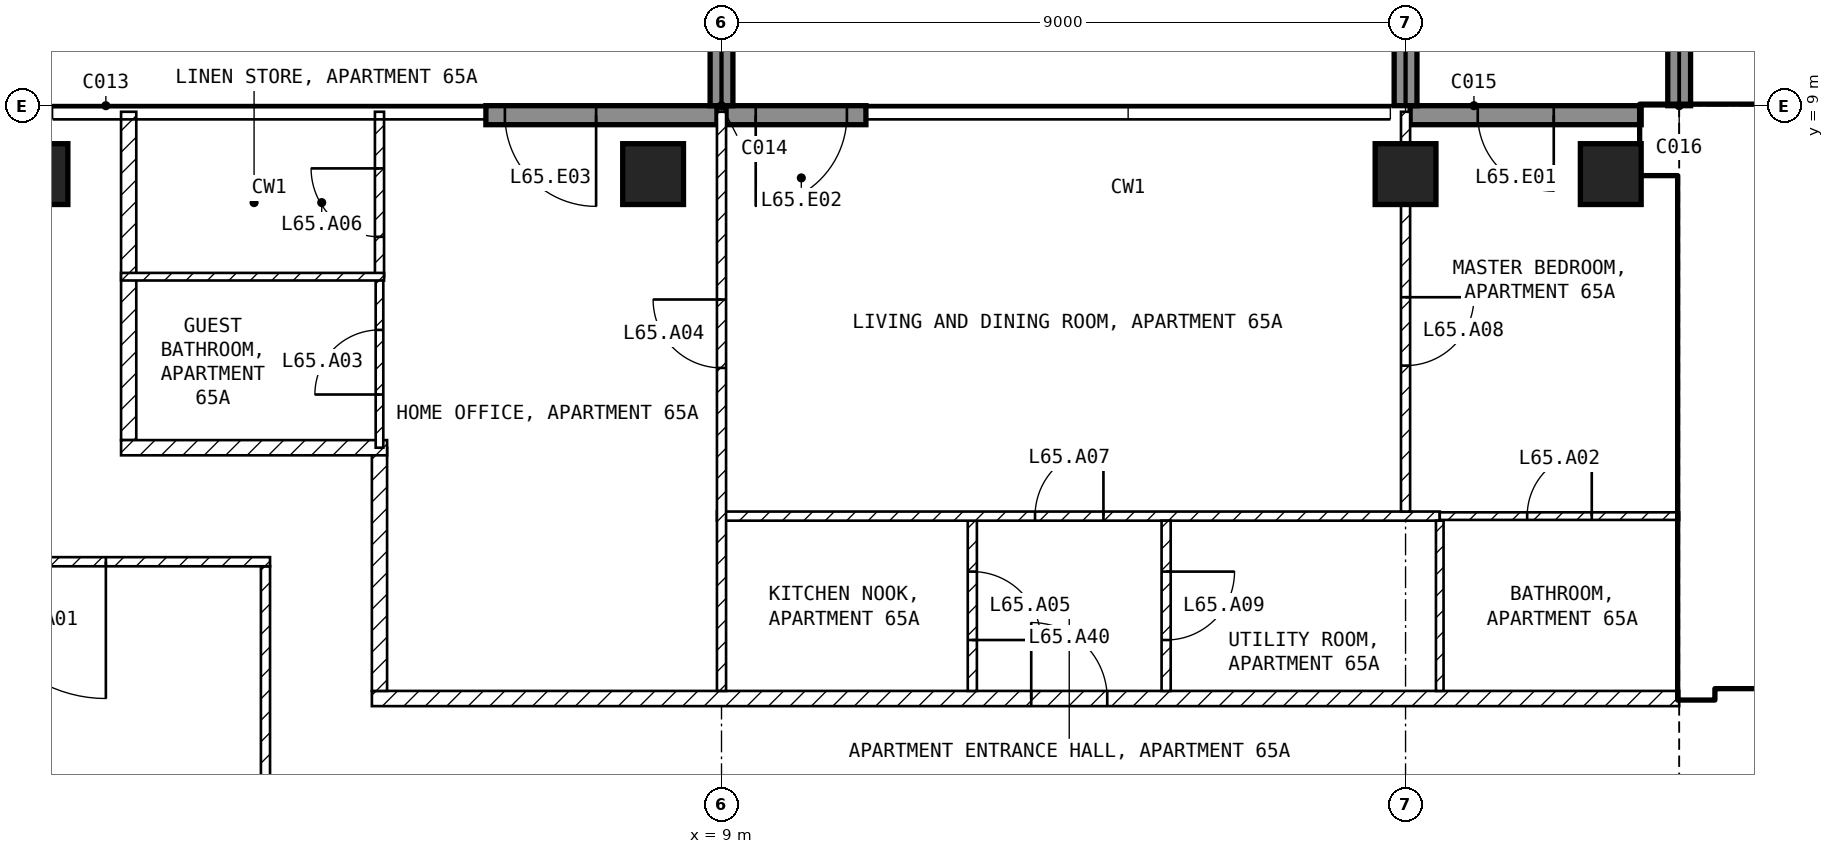
"""IFC4 building model, lengths in metres.
Left out: names, types, materials, properties, quantities, classifications, styles, units other than length and angle.
Written with IfcOpenShell. Run it as: python <this file> out.ifc"""

import sys

from ifc_helpers import new_model, si_unit, direction, frame, frame_2d, origin, origin_2d, place, context, subcontext, project, spatial, rectangle, extrude, element, fill, save


model = new_model("IFC4")
c1 = context("Model", 3, precision=1e-05, world=origin(), true_north=direction((0.0, 1.0)))
c2 = subcontext(c1, "Body", "Model", "MODEL_VIEW")
j1 = project(units=[si_unit("LENGTHUNIT", "METRE"), si_unit("PLANEANGLEUNIT", "RADIAN")], contexts=[c1])
p1 = place(None, origin())
s1 = spatial("IfcSite", under=j1, at=p1, CompositionType="ELEMENT")
p2 = place(p1, origin())
s2 = spatial("IfcBuilding", under=s1, at=p2, CompositionType="ELEMENT")
p3 = place(p2, frame((0.0, 0.0, 257.0)))
s3 = spatial("IfcBuildingStorey", under=s2, at=p3, CompositionType="ELEMENT", Elevation=257.0)
for number, where, z_axis, x_axis in (
    (1, (0.0, 8.1, -0.25), (0.0, 0.0, 1.0), (1.0, 0.0, 0.0)),
    (2, (8.1, 8.1, -0.25), (0.0, 0.0, 1.0), (1.0, 0.0, 0.0)),
    (3, (18.0, 8.1, -0.25), (0.0, 0.0, 1.0), (1.0, 0.0, 0.0)),
    (4, (20.7, 8.1, -0.25), (0.0, 0.0, 1.0), (1.0, 0.0, 0.0)),
):
    element("IfcColumn", number, at=place(p3, frame(where, z_axis=z_axis, x_axis=x_axis)), inside=s3, PredefinedType="COLUMN", context=c2, shape_type="SweptSolid", body=[
        extrude(rectangle(XDim=0.8, YDim=0.8, at=origin_2d()), origin(), (0.0, 0.0, 1.0), 3.5),
    ])
p4 = place(p3, frame((21.1, 8.875, 0.0), z_axis=(0.0, 0.0, 1.0), x_axis=(-1.0, 0.0, 0.0)))
e5 = element("IfcWall", 5, at=p4, inside=s3, PredefinedType="SOLIDWALL", context=c2, shape_type="SweptSolid", body=[
    extrude(rectangle(XDim=3.04, YDim=0.25, at=frame_2d((1.52, 0.0))), origin(), (0.0, 0.0, 1.0), 3.25),
])
p5 = place(p4, frame((1.15, 0.0, 0.0)))
e6 = element("IfcOpeningElement", 6, at=p5, cuts=e5, PredefinedType="OPENING", context=c2, shape_type="SweptSolid", body=[
    extrude(rectangle(XDim=1.0, YDim=2.4, at=frame_2d((0.5, 1.2))), frame((0.0, 0.135, 0.0), z_axis=(0.0, -1.0, 0.0), x_axis=(1.0, 0.0, 0.0)), (0.0, 0.0, 1.0), 0.27),
])
p6 = place(p3, frame((10.9, 8.875, 0.0), z_axis=(0.0, 0.0, 1.0), x_axis=(-1.0, 0.0, 0.0)))
e7 = element("IfcWall", 7, at=p6, inside=s3, PredefinedType="SOLIDWALL", context=c2, shape_type="SweptSolid", body=[
    extrude(rectangle(XDim=1.84, YDim=0.25, at=frame_2d((0.92, 0.0))), origin(), (0.0, 0.0, 1.0), 3.25),
])
p7 = place(p6, frame((0.25, 0.0, 0.0)))
e8 = element("IfcOpeningElement", 8, at=p7, cuts=e7, PredefinedType="OPENING", context=c2, shape_type="SweptSolid", body=[
    extrude(rectangle(XDim=1.2, YDim=2.4, at=frame_2d((0.6, 1.2))), frame((0.0, 0.135, 0.0), z_axis=(0.0, -1.0, 0.0), x_axis=(1.0, 0.0, 0.0)), (0.0, 0.0, 1.0), 0.27),
])
p8 = place(p3, frame((8.94, 8.875, 0.0), z_axis=(0.0, 0.0, 1.0), x_axis=(-1.0, 0.0, 0.0)))
e9 = element("IfcWall", 9, at=p8, inside=s3, PredefinedType="SOLIDWALL", context=c2, shape_type="SweptSolid", body=[
    extrude(rectangle(XDim=3.04, YDim=0.25, at=frame_2d((1.52, 0.0))), origin(), (0.0, 0.0, 1.0), 3.25),
])
p9 = place(p8, frame((1.59, 0.0, 0.0)))
e10 = element("IfcOpeningElement", 10, at=p9, cuts=e9, PredefinedType="OPENING", context=c2, shape_type="SweptSolid", body=[
    extrude(rectangle(XDim=1.2, YDim=2.4, at=frame_2d((0.6, 1.2))), frame((0.0, 0.135, 0.0), z_axis=(0.0, -1.0, 0.0), x_axis=(1.0, 0.0, 0.0)), (0.0, 0.0, 1.0), 0.27),
])
for number, where, z_axis, x_axis in (
    (11, (9.0, 9.0, 0.0), (0.0, 0.0, 1.0), (0.0, 1.0, 0.0)),
    (12, (18.0, 9.0, 0.0), (0.0, 0.0, 1.0), (0.0, 1.0, 0.0)),
    (13, (21.6, 9.0, 0.0), (0.0, 0.0, 1.0), (0.0, 1.0, 0.0)),
):
    element("IfcWall", number, at=place(p3, frame(where, z_axis=z_axis, x_axis=x_axis)), inside=s3, PredefinedType="SOLIDWALL", context=c2, shape_type="SweptSolid", body=[
        extrude(rectangle(XDim=2.7, YDim=0.3, at=frame_2d((1.35, 0.0))), origin(), (0.0, 0.0, 1.0), 3.25),
    ])
p10 = place(p3, frame((21.1, 8.55, 0.0), z_axis=(0.0, 0.0, 1.0), x_axis=(1.0, 0.0, 0.0)))
e14 = element("IfcWall", 14, at=p10, inside=s3, PredefinedType="SHEAR", context=c2, shape_type="SweptSolid", body=[
    extrude(rectangle(XDim=8.65, YDim=0.9, at=frame_2d((4.325, 0.0))), origin(), (0.0, 0.0, 1.0), 3.25),
])
p11 = place(p3, frame((21.825, 1.2, 0.0), z_axis=(0.0, 0.0, 1.0), x_axis=(0.0, 1.0, 0.0)))
e15 = element("IfcWall", 15, at=p11, inside=s3, PredefinedType="SHEAR", context=c2, shape_type="SweptSolid", body=[
    extrude(rectangle(XDim=6.9, YDim=0.45, at=frame_2d((3.45, 0.0))), origin(), (0.0, 0.0, 1.0), 3.25),
])
p12 = place(p3, frame((22.05, 1.45, 0.0), z_axis=(0.0, 0.0, 1.0), x_axis=(1.0, 0.0, 0.0)))
e16 = element("IfcWall", 16, at=p12, inside=s3, PredefinedType="SOLIDWALL", context=c2, shape_type="SweptSolid", body=[
    extrude(rectangle(XDim=11.3, YDim=0.2, at=frame_2d((5.65, 0.0))), origin(), (0.0, 0.0, 1.0), 3.25),
])
p13 = place(p12, frame((0.75, 0.0, 0.0)))
e17 = element("IfcOpeningElement", 17, at=p13, cuts=e16, PredefinedType="OPENING", context=c2, shape_type="SweptSolid", body=[
    extrude(rectangle(XDim=1.0, YDim=2.1, at=frame_2d((0.5, 1.05))), frame((0.0, 0.11, 0.0), z_axis=(0.0, -1.0, 0.0), x_axis=(1.0, 0.0, 0.0)), (0.0, 0.0, 1.0), 0.22),
])
p14 = place(p12, frame((3.25, 0.0, 0.0)))
e18 = element("IfcOpeningElement", 18, at=p14, cuts=e16, PredefinedType="OPENING", context=c2, shape_type="SweptSolid", body=[
    extrude(rectangle(XDim=1.0, YDim=2.1, at=frame_2d((0.5, 1.05))), frame((0.0, 0.11, 0.0), z_axis=(0.0, -1.0, 0.0), x_axis=(1.0, 0.0, 0.0)), (0.0, 0.0, 1.0), 0.22),
])
p15 = place(p12, frame((9.225, 0.0, 0.0)))
e19 = element("IfcOpeningElement", 19, at=p15, cuts=e16, PredefinedType="OPENING", context=c2, shape_type="SweptSolid", body=[
    extrude(rectangle(XDim=0.9, YDim=2.1, at=frame_2d((0.45, 1.05))), frame((0.0, 0.11, 0.0), z_axis=(0.0, -1.0, 0.0), x_axis=(1.0, 0.0, 0.0)), (0.0, 0.0, 1.0), 0.22),
])
p16 = place(p3, frame((22.05, 5.15, 0.0), z_axis=(0.0, 0.0, 1.0), x_axis=(1.0, 0.0, 0.0)))
e20 = element("IfcWall", 20, at=p16, inside=s3, PredefinedType="SOLIDWALL", context=c2, shape_type="SweptSolid", body=[
    extrude(rectangle(XDim=6.3, YDim=0.2, at=frame_2d((3.15, 0.0))), origin(), (0.0, 0.0, 1.0), 3.25),
])
p17 = place(p16, frame((0.2, 0.0, 0.0)))
e21 = element("IfcOpeningElement", 21, at=p17, cuts=e20, PredefinedType="OPENING", context=c2, shape_type="SweptSolid", body=[
    extrude(rectangle(XDim=1.0, YDim=2.1, at=frame_2d((0.5, 1.05))), frame((0.0, 0.11, 0.0), z_axis=(0.0, -1.0, 0.0), x_axis=(1.0, 0.0, 0.0)), (0.0, 0.0, 1.0), 0.22),
])
p18 = place(p3, frame((3.0, -2.94, 0.0), z_axis=(0.0, 0.0, 1.0), x_axis=(0.0, 1.0, 0.0)))
e22 = element("IfcWall", 22, at=p18, inside=s3, PredefinedType="PARTITIONING", context=c2, shape_type="SweptSolid", body=[
    extrude(rectangle(XDim=5.88, YDim=0.12, at=frame_2d((2.94, 0.0))), origin(), (0.0, 0.0, 1.0), 3.25),
])
p19 = place(p3, frame((3.06, 3.0, 0.0), z_axis=(0.0, 0.0, 1.0), x_axis=(-1.0, 0.0, 0.0)))
e23 = element("IfcWall", 23, at=p19, inside=s3, PredefinedType="PARTITIONING", context=c2, shape_type="SweptSolid", body=[
    extrude(rectangle(XDim=6.12, YDim=0.12, at=frame_2d((3.06, 0.0))), origin(), (0.0, 0.0, 1.0), 3.25),
])
p20 = place(p19, frame((2.16, 0.0, 0.0)))
e24 = element("IfcOpeningElement", 24, at=p20, cuts=e23, PredefinedType="OPENING", context=c2, shape_type="SweptSolid", body=[
    extrude(rectangle(XDim=1.8, YDim=2.1, at=frame_2d((0.9, 1.05))), frame((0.0, 0.07, 0.0), z_axis=(0.0, -1.0, 0.0), x_axis=(1.0, 0.0, 0.0)), (0.0, 0.0, 1.0), 0.14),
])
p21 = place(p3, frame((4.4, 1.2, 0.0), z_axis=(0.0, 0.0, 1.0), x_axis=(1.0, 0.0, 0.0)))
e25 = element("IfcWall", 25, at=p21, inside=s3, PredefinedType="PARTITIONING", context=c2, shape_type="SweptSolid", body=[
    extrude(rectangle(XDim=17.2, YDim=0.2, at=frame_2d((8.6, 0.0))), origin(), (0.0, 0.0, 1.0), 3.25),
])
p22 = place(p21, frame((8.675, 0.0, 0.0)))
e26 = element("IfcOpeningElement", 26, at=p22, cuts=e25, PredefinedType="OPENING", context=c2, shape_type="SweptSolid", body=[
    extrude(rectangle(XDim=1.0, YDim=2.1, at=frame_2d((0.5, 1.05))), frame((0.0, 0.11, 0.0), z_axis=(0.0, -1.0, 0.0), x_axis=(1.0, 0.0, 0.0)), (0.0, 0.0, 1.0), 0.22),
])
p23 = place(p3, frame((4.5, 4.5, 0.0), z_axis=(0.0, 0.0, 1.0), x_axis=(0.0, -1.0, 0.0)))
e27 = element("IfcWall", 27, at=p23, inside=s3, PredefinedType="PARTITIONING", context=c2, shape_type="SweptSolid", body=[
    extrude(rectangle(XDim=3.2, YDim=0.2, at=frame_2d((1.6, 0.0))), origin(), (0.0, 0.0, 1.0), 3.25),
])
p24 = place(p3, frame((1.2, 8.92, 0.0), z_axis=(0.0, 0.0, 1.0), x_axis=(0.0, -1.0, 0.0)))
e28 = element("IfcWall", 28, at=p24, inside=s3, PredefinedType="PARTITIONING", context=c2, shape_type="SweptSolid", body=[
    extrude(rectangle(XDim=4.32, YDim=0.2, at=frame_2d((2.16, 0.0))), origin(), (0.0, 0.0, 1.0), 3.25),
])
p25 = place(p3, frame((1.1, 4.5, 0.0), z_axis=(0.0, 0.0, 1.0), x_axis=(1.0, 0.0, 0.0)))
e29 = element("IfcWall", 29, at=p25, inside=s3, PredefinedType="PARTITIONING", context=c2, shape_type="SweptSolid", body=[
    extrude(rectangle(XDim=3.5, YDim=0.2, at=frame_2d((1.75, 0.0))), origin(), (0.0, 0.0, 1.0), 3.25),
])
p26 = place(p3, frame((12.3, 3.54, 0.0), z_axis=(0.0, 0.0, 1.0), x_axis=(0.0, -1.0, 0.0)))
e30 = element("IfcWall", 30, at=p26, inside=s3, PredefinedType="PARTITIONING", context=c2, shape_type="SweptSolid", body=[
    extrude(rectangle(XDim=2.24, YDim=0.12, at=frame_2d((1.12, 0.0))), origin(), (0.0, 0.0, 1.0), 3.25),
])
p27 = place(p26, frame((0.67, 0.0, 0.0)))
e31 = element("IfcOpeningElement", 31, at=p27, cuts=e30, PredefinedType="OPENING", context=c2, shape_type="SweptSolid", body=[
    extrude(rectangle(XDim=0.9, YDim=2.1, at=frame_2d((0.45, 1.05))), frame((0.0, 0.07, 0.0), z_axis=(0.0, -1.0, 0.0), x_axis=(1.0, 0.0, 0.0)), (0.0, 0.0, 1.0), 0.14),
])
p28 = place(p3, frame((8.94, 3.6, 0.0), z_axis=(0.0, 0.0, 1.0), x_axis=(1.0, 0.0, 0.0)))
e32 = element("IfcWall", 32, at=p28, inside=s3, PredefinedType="PARTITIONING", context=c2, shape_type="SweptSolid", body=[
    extrude(rectangle(XDim=9.51, YDim=0.12, at=frame_2d((4.755, 0.0))), origin(), (0.0, 0.0, 1.0), 3.25),
])
p29 = place(p28, frame((4.185, 0.0, 0.0)))
e33 = element("IfcOpeningElement", 33, at=p29, cuts=e32, PredefinedType="OPENING", context=c2, shape_type="SweptSolid", body=[
    extrude(rectangle(XDim=0.9, YDim=2.1, at=frame_2d((0.45, 1.05))), frame((0.0, 0.07, 0.0), z_axis=(0.0, -1.0, 0.0), x_axis=(1.0, 0.0, 0.0)), (0.0, 0.0, 1.0), 0.14),
])
p30 = place(p3, frame((9.0, 1.3, 0.0), z_axis=(0.0, 0.0, 1.0), x_axis=(0.0, 1.0, 0.0)))
e34 = element("IfcWall", 34, at=p30, inside=s3, PredefinedType="PARTITIONING", context=c2, shape_type="SweptSolid", body=[
    extrude(rectangle(XDim=7.62, YDim=0.12, at=frame_2d((3.81, 0.0))), origin(), (0.0, 0.0, 1.0), 3.25),
])
p31 = place(p30, frame((4.25, 0.0, 0.0)))
e35 = element("IfcOpeningElement", 35, at=p31, cuts=e34, PredefinedType="OPENING", context=c2, shape_type="SweptSolid", body=[
    extrude(rectangle(XDim=0.9, YDim=2.1, at=frame_2d((0.45, 1.05))), frame((0.0, 0.07, 0.0), z_axis=(0.0, -1.0, 0.0), x_axis=(1.0, 0.0, 0.0)), (0.0, 0.0, 1.0), 0.14),
])
p32 = place(p3, frame((14.85, 3.54, 0.0), z_axis=(0.0, 0.0, 1.0), x_axis=(0.0, -1.0, 0.0)))
e36 = element("IfcWall", 36, at=p32, inside=s3, PredefinedType="PARTITIONING", context=c2, shape_type="SweptSolid", body=[
    extrude(rectangle(XDim=2.24, YDim=0.12, at=frame_2d((1.12, 0.0))), origin(), (0.0, 0.0, 1.0), 3.25),
])
p33 = place(p32, frame((0.67, 0.0, 0.0)))
e37 = element("IfcOpeningElement", 37, at=p33, cuts=e36, PredefinedType="OPENING", context=c2, shape_type="SweptSolid", body=[
    extrude(rectangle(XDim=0.9, YDim=2.1, at=frame_2d((0.45, 1.05))), frame((0.0, 0.07, 0.0), z_axis=(0.0, -1.0, 0.0), x_axis=(1.0, 0.0, 0.0)), (0.0, 0.0, 1.0), 0.14),
])
p34 = place(p3, frame((18.45, 3.54, 0.0), z_axis=(0.0, 0.0, 1.0), x_axis=(0.0, -1.0, 0.0)))
e38 = element("IfcWall", 38, at=p34, inside=s3, PredefinedType="PARTITIONING", context=c2, shape_type="SweptSolid", body=[
    extrude(rectangle(XDim=2.24, YDim=0.1, at=frame_2d((1.12, 0.0))), origin(), (0.0, 0.0, 1.0), 3.25),
])
p35 = place(p3, frame((18.45, 3.6, 0.0), z_axis=(0.0, 0.0, 1.0), x_axis=(1.0, 0.0, 0.0)))
e39 = element("IfcWall", 39, at=p35, inside=s3, PredefinedType="PARTITIONING", context=c2, shape_type="SweptSolid", body=[
    extrude(rectangle(XDim=3.15, YDim=0.1, at=frame_2d((1.575, 0.0))), origin(), (0.0, 0.0, 1.0), 3.25),
])
p36 = place(p35, frame((1.15, 0.0, 0.0)))
e40 = element("IfcOpeningElement", 40, at=p36, cuts=e39, PredefinedType="OPENING", context=c2, shape_type="SweptSolid", body=[
    extrude(rectangle(XDim=0.85, YDim=2.1, at=frame_2d((0.425, 1.05))), frame((0.0, 0.06, 0.0), z_axis=(0.0, -1.0, 0.0), x_axis=(1.0, 0.0, 0.0)), (0.0, 0.0, 1.0), 0.12),
])
p37 = place(p3, frame((18.0, 8.92, 0.0), z_axis=(0.0, 0.0, 1.0), x_axis=(0.0, -1.0, 0.0)))
e41 = element("IfcWall", 41, at=p37, inside=s3, PredefinedType="PARTITIONING", context=c2, shape_type="SweptSolid", body=[
    extrude(rectangle(XDim=5.26, YDim=0.12, at=frame_2d((2.63, 0.0))), origin(), (0.0, 0.0, 1.0), 2.496),
])
p38 = place(p37, frame((2.44, 0.0, 0.0)))
e42 = element("IfcOpeningElement", 42, at=p38, cuts=e41, PredefinedType="OPENING", context=c2, shape_type="SweptSolid", body=[
    extrude(rectangle(XDim=0.9, YDim=2.1, at=frame_2d((0.45, 1.05))), frame((0.0, 0.07, 0.0), z_axis=(0.0, -1.0, 0.0), x_axis=(1.0, 0.0, 0.0)), (0.0, 0.0, 1.0), 0.14),
])
p39 = place(p3, frame((4.5, 4.5, 0.0), z_axis=(0.0, 0.0, 1.0), x_axis=(0.0, 1.0, 0.0)))
e43 = element("IfcWall", 43, at=p39, inside=s3, PredefinedType="PARTITIONING", context=c2, shape_type="SweptSolid", body=[
    extrude(rectangle(XDim=2.25, YDim=0.1, at=frame_2d((1.125, 0.0))), origin(), (0.0, 0.0, 1.0), 3.25),
])
p40 = place(p39, frame((0.7, 0.0, 0.0)))
e44 = element("IfcOpeningElement", 44, at=p40, cuts=e43, PredefinedType="OPENING", context=c2, shape_type="SweptSolid", body=[
    extrude(rectangle(XDim=0.85, YDim=2.1, at=frame_2d((0.425, 1.05))), frame((0.0, 0.06, 0.0), z_axis=(0.0, -1.0, 0.0), x_axis=(1.0, 0.0, 0.0)), (0.0, 0.0, 1.0), 0.12),
])
p41 = place(p3, frame((4.5, 6.75, 0.0), z_axis=(0.0, 0.0, 1.0), x_axis=(0.0, 1.0, 0.0)))
e45 = element("IfcWall", 45, at=p41, inside=s3, PredefinedType="PARTITIONING", context=c2, shape_type="SweptSolid", body=[
    extrude(rectangle(XDim=2.17, YDim=0.12, at=frame_2d((1.085, 0.0))), origin(), (0.0, 0.0, 1.0), 3.25),
])
p42 = place(p41, frame((0.525, 0.0, 0.0)))
e46 = element("IfcOpeningElement", 46, at=p42, cuts=e45, PredefinedType="OPENING", context=c2, shape_type="SweptSolid", body=[
    extrude(rectangle(XDim=0.9, YDim=2.1, at=frame_2d((0.45, 1.05))), frame((0.0, 0.07, 0.0), z_axis=(0.0, -1.0, 0.0), x_axis=(1.0, 0.0, 0.0)), (0.0, 0.0, 1.0), 0.14),
])
p43 = place(p3, frame((1.1, 6.75, 0.0), z_axis=(0.0, 0.0, 1.0), x_axis=(1.0, 0.0, 0.0)))
e47 = element("IfcWall", 47, at=p43, inside=s3, PredefinedType="PARTITIONING", context=c2, shape_type="SweptSolid", body=[
    extrude(rectangle(XDim=3.46, YDim=0.1, at=frame_2d((1.73, 0.0))), origin(), (0.0, 0.0, 1.0), 3.25),
])
p44 = place(p5, origin())
e48 = element("IfcDoor", 48, at=p44, inside=s3, OperationType="SINGLE_SWING_LEFT", PredefinedType="DOOR", context=c2, shape_type="SweptSolid", body=[
    extrude(rectangle(XDim=1.0, YDim=2.4, at=frame_2d((0.5, 1.2))), frame((0.0, 0.025, 0.0), z_axis=(0.0, -1.0, 0.0), x_axis=(1.0, 0.0, 0.0)), (0.0, 0.0, 1.0), 0.05),
])
fill(e6, e48)
p45 = place(p7, origin())
e49 = element("IfcDoor", 49, at=p45, inside=s3, OperationType="SINGLE_SWING_RIGHT", PredefinedType="DOOR", context=c2, shape_type="SweptSolid", body=[
    extrude(rectangle(XDim=1.2, YDim=2.4, at=frame_2d((0.6, 1.2))), frame((0.0, 0.025, 0.0), z_axis=(0.0, -1.0, 0.0), x_axis=(1.0, 0.0, 0.0)), (0.0, 0.0, 1.0), 0.05),
])
fill(e8, e49)
p46 = place(p9, origin())
e50 = element("IfcDoor", 50, at=p46, inside=s3, OperationType="SINGLE_SWING_LEFT", PredefinedType="DOOR", context=c2, shape_type="SweptSolid", body=[
    extrude(rectangle(XDim=1.2, YDim=2.4, at=frame_2d((0.6, 1.2))), frame((0.0, 0.025, 0.0), z_axis=(0.0, -1.0, 0.0), x_axis=(1.0, 0.0, 0.0)), (0.0, 0.0, 1.0), 0.05),
])
fill(e10, e50)
p47 = place(p17, origin())
e51 = element("IfcDoor", 51, at=p47, inside=s3, OperationType="SINGLE_SWING_LEFT", PredefinedType="DOOR", context=c2, shape_type="SweptSolid", body=[
    extrude(rectangle(XDim=1.0, YDim=2.1, at=frame_2d((0.5, 1.05))), frame((0.0, 0.025, 0.0), z_axis=(0.0, -1.0, 0.0), x_axis=(1.0, 0.0, 0.0)), (0.0, 0.0, 1.0), 0.05),
])
fill(e21, e51)
p48 = place(p20, origin())
e52 = element("IfcDoor", 52, at=p48, inside=s3, OperationType="SINGLE_SWING_LEFT", PredefinedType="DOOR", context=c2, shape_type="SweptSolid", body=[
    extrude(rectangle(XDim=1.8, YDim=2.1, at=frame_2d((0.9, 1.05))), frame((0.0, 0.025, 0.0), z_axis=(0.0, -1.0, 0.0), x_axis=(1.0, 0.0, 0.0)), (0.0, 0.0, 1.0), 0.05),
])
fill(e24, e52)
p49 = place(p36, origin())
e53 = element("IfcDoor", 53, at=p49, inside=s3, OperationType="SINGLE_SWING_RIGHT", PredefinedType="DOOR", context=c2, shape_type="SweptSolid", body=[
    extrude(rectangle(XDim=0.85, YDim=2.1, at=frame_2d((0.425, 1.05))), frame((0.0, 0.025, 0.0), z_axis=(0.0, -1.0, 0.0), x_axis=(1.0, 0.0, 0.0)), (0.0, 0.0, 1.0), 0.05),
])
fill(e40, e53)
p50 = place(p40, origin())
e54 = element("IfcDoor", 54, at=p50, inside=s3, OperationType="SINGLE_SWING_LEFT", PredefinedType="DOOR", context=c2, shape_type="SweptSolid", body=[
    extrude(rectangle(XDim=0.85, YDim=2.1, at=frame_2d((0.425, 1.05))), frame((0.0, 0.025, 0.0), z_axis=(0.0, -1.0, 0.0), x_axis=(1.0, 0.0, 0.0)), (0.0, 0.0, 1.0), 0.05),
])
fill(e44, e54)
p51 = place(p31, origin())
e55 = element("IfcDoor", 55, at=p51, inside=s3, OperationType="SINGLE_SWING_RIGHT", PredefinedType="DOOR", context=c2, shape_type="SweptSolid", body=[
    extrude(rectangle(XDim=0.9, YDim=2.1, at=frame_2d((0.45, 1.05))), frame((0.0, 0.025, 0.0), z_axis=(0.0, -1.0, 0.0), x_axis=(1.0, 0.0, 0.0)), (0.0, 0.0, 1.0), 0.05),
])
fill(e35, e55)
p52 = place(p27, origin())
e56 = element("IfcDoor", 56, at=p52, inside=s3, OperationType="SINGLE_SWING_RIGHT", PredefinedType="DOOR", context=c2, shape_type="SweptSolid", body=[
    extrude(rectangle(XDim=0.9, YDim=2.1, at=frame_2d((0.45, 1.05))), frame((0.0, 0.025, 0.0), z_axis=(0.0, -1.0, 0.0), x_axis=(1.0, 0.0, 0.0)), (0.0, 0.0, 1.0), 0.05),
])
fill(e31, e56)
p53 = place(p42, origin())
e57 = element("IfcDoor", 57, at=p53, inside=s3, OperationType="SINGLE_SWING_RIGHT", PredefinedType="DOOR", context=c2, shape_type="SweptSolid", body=[
    extrude(rectangle(XDim=0.9, YDim=2.1, at=frame_2d((0.45, 1.05))), frame((0.0, 0.025, 0.0), z_axis=(0.0, -1.0, 0.0), x_axis=(1.0, 0.0, 0.0)), (0.0, 0.0, 1.0), 0.05),
])
fill(e46, e57)
p54 = place(p29, origin())
e58 = element("IfcDoor", 58, at=p54, inside=s3, OperationType="SINGLE_SWING_RIGHT", PredefinedType="DOOR", context=c2, shape_type="SweptSolid", body=[
    extrude(rectangle(XDim=0.9, YDim=2.1, at=frame_2d((0.45, 1.05))), frame((0.0, 0.025, 0.0), z_axis=(0.0, -1.0, 0.0), x_axis=(1.0, 0.0, 0.0)), (0.0, 0.0, 1.0), 0.05),
])
fill(e33, e58)
p55 = place(p38, origin())
e59 = element("IfcDoor", 59, at=p55, inside=s3, OperationType="SINGLE_SWING_LEFT", PredefinedType="DOOR", context=c2, shape_type="SweptSolid", body=[
    extrude(rectangle(XDim=0.9, YDim=2.1, at=frame_2d((0.45, 1.05))), frame((0.0, 0.025, 0.0), z_axis=(0.0, -1.0, 0.0), x_axis=(1.0, 0.0, 0.0)), (0.0, 0.0, 1.0), 0.05),
])
fill(e42, e59)
p56 = place(p33, origin())
e60 = element("IfcDoor", 60, at=p56, inside=s3, OperationType="SINGLE_SWING_LEFT", PredefinedType="DOOR", context=c2, shape_type="SweptSolid", body=[
    extrude(rectangle(XDim=0.9, YDim=2.1, at=frame_2d((0.45, 1.05))), frame((0.0, 0.025, 0.0), z_axis=(0.0, -1.0, 0.0), x_axis=(1.0, 0.0, 0.0)), (0.0, 0.0, 1.0), 0.05),
])
fill(e37, e60)
p57 = place(p22, origin())
e61 = element("IfcDoor", 61, at=p57, inside=s3, OperationType="SINGLE_SWING_LEFT", PredefinedType="DOOR", context=c2, shape_type="SweptSolid", body=[
    extrude(rectangle(XDim=1.0, YDim=2.1, at=frame_2d((0.5, 1.05))), frame((0.0, 0.025, 0.0), z_axis=(0.0, -1.0, 0.0), x_axis=(1.0, 0.0, 0.0)), (0.0, 0.0, 1.0), 0.05),
])
fill(e26, e61)
save(model, sys.argv[1])
